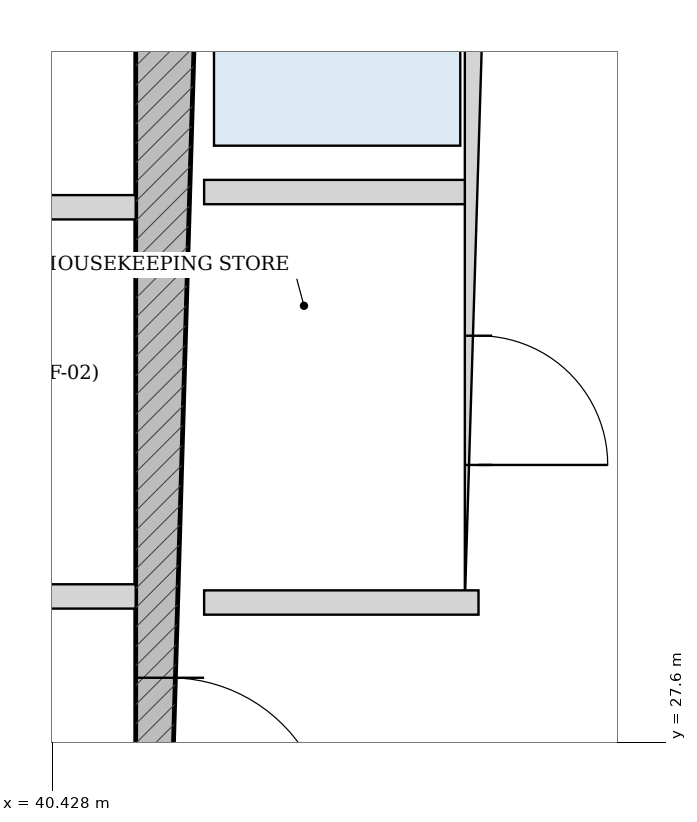
"""IFC4 building model, lengths in metres.
Left out: names, types, materials, properties, quantities, classifications, styles, units other than length and angle.
Written with IfcOpenShell. Run it as: python <this file> out.ifc"""

import sys

from ifc_helpers import new_model, si_unit, direction, frame, frame_2d, origin, place, context, subcontext, project, spatial, rectangle, extrude, source, transform, mapped, element, fill, save


model = new_model("IFC4")
c1 = context("Model", 3, precision=1e-05, world=origin(), true_north=direction((-0.2419218956, 0.970295726276)))
c2 = subcontext(c1, "Body", "Model", "MODEL_VIEW")
j1 = project(units=[si_unit("LENGTHUNIT", "METRE"), si_unit("PLANEANGLEUNIT", "RADIAN")], contexts=[c1])
p1 = place(None, origin())
s1 = spatial("IfcSite", under=j1, at=p1, CompositionType="ELEMENT")
p2 = place(p1, origin())
s2 = spatial("IfcBuilding", under=s1, at=p2, CompositionType="ELEMENT")
p3 = place(p2, frame((0.0, 0.0, 130.2)))
s3 = spatial("IfcBuildingStorey", under=s2, at=p3, CompositionType="ELEMENT", Elevation=130.2)
p4 = place(p3, frame((41.2, 19.175, 0.0), z_axis=(0.0, 0.0, 1.0), x_axis=(0.0, 1.0, 0.0)))
e1 = element("IfcWall", 1, at=p4, inside=s3, PredefinedType="SHEAR", context=c2, shape_type="SweptSolid", body=[
    extrude(rectangle(XDim=15.25, YDim=0.45, at=frame_2d((7.625, 0.0))), origin(), (0.0, 0.0, 1.0), 4.93),
])
p5 = place(p4, frame((7.8, 0.0, 0.0)))
e2 = element("IfcOpeningElement", 2, at=p5, cuts=e1, PredefinedType="OPENING", context=c2, shape_type="SweptSolid", body=[
    extrude(rectangle(XDim=1.05, YDim=2.15, at=frame_2d((0.525, 1.075))), frame((0.0, 0.235, 0.0), z_axis=(0.0, -1.0, 0.0), x_axis=(1.0, 0.0, 0.0)), (0.0, 0.0, 1.0), 0.47),
])
p6 = place(p3, frame((43.23, 28.52, 0.0), z_axis=(0.0, 0.0, 1.0), x_axis=(0.0, 1.0, 0.0)))
e3 = element("IfcWall", 3, at=p6, inside=s3, PredefinedType="PARTITIONING", context=c2, shape_type="SweptSolid", body=[
    extrude(rectangle(XDim=5.905, YDim=0.18, at=frame_2d((2.953, 0.0))), origin(), (0.0, 0.0, 1.0), 4.93),
])
p7 = place(p6, frame((0.905, 0.0, 0.0)))
e4 = element("IfcOpeningElement", 4, at=p7, cuts=e3, PredefinedType="OPENING", context=c2, shape_type="SweptSolid", body=[
    extrude(rectangle(XDim=0.85, YDim=2.1, at=frame_2d((0.425, 1.05))), frame((0.0, 0.1, 0.0), z_axis=(0.0, -1.0, 0.0), x_axis=(1.0, 0.0, 0.0)), (0.0, 0.0, 1.0), 0.2),
])
p8 = place(p6, frame((3.655, 0.0, 0.0)))
e5 = element("IfcOpeningElement", 5, at=p8, cuts=e3, PredefinedType="OPENING", context=c2, shape_type="SweptSolid", body=[
    extrude(rectangle(XDim=1.15, YDim=2.2, at=frame_2d((0.575, 1.1))), frame((0.0, 0.1, 0.0), z_axis=(0.0, -1.0, 0.0), x_axis=(1.0, 0.0, 0.0)), (0.0, 0.0, 1.0), 0.2),
])
p9 = place(p3, frame((41.425, 31.22, 0.0), z_axis=(0.0, 0.0, 1.0), x_axis=(1.0, 0.0, 0.0)))
e6 = element("IfcWall", 6, at=p9, inside=s3, PredefinedType="PARTITIONING", context=c2, shape_type="SweptSolid", body=[
    extrude(rectangle(XDim=1.715, YDim=0.16, at=frame_2d((0.857, 0.0))), origin(), (0.0, 0.0, 1.0), 4.93),
])
p10 = place(p3, frame((41.425, 28.52, 0.0), z_axis=(0.0, 0.0, 1.0), x_axis=(1.0, 0.0, 0.0)))
e7 = element("IfcWall", 7, at=p10, inside=s3, PredefinedType="PARTITIONING", context=c2, shape_type="SweptSolid", body=[
    extrude(rectangle(XDim=1.805, YDim=0.16, at=frame_2d((0.902, 0.0))), origin(), (0.0, 0.0, 1.0), 4.93),
])
p11 = place(p3, frame((35.025, 28.56, 0.0), z_axis=(0.0, 0.0, 1.0), x_axis=(1.0, 0.0, 0.0)))
e8 = element("IfcWall", 8, at=p11, inside=s3, PredefinedType="PARTITIONING", context=c2, shape_type="SweptSolid", body=[
    extrude(rectangle(XDim=5.95, YDim=0.16, at=frame_2d((2.975, 0.0))), origin(), (0.0, 0.0, 1.0), 4.93),
])
p12 = place(p11, frame((0.76, 0.0, 0.0)))
e9 = element("IfcOpeningElement", 9, at=p12, cuts=e8, PredefinedType="OPENING", context=c2, shape_type="SweptSolid", body=[
    extrude(rectangle(XDim=1.1, YDim=2.2, at=frame_2d((0.55, 1.1))), frame((0.0, 0.09, 0.0), z_axis=(0.0, -1.0, 0.0), x_axis=(1.0, 0.0, 0.0)), (0.0, 0.0, 1.0), 0.18),
])
p13 = place(p11, frame((2.425, 0.0, 0.0)))
e10 = element("IfcOpeningElement", 10, at=p13, cuts=e8, PredefinedType="OPENING", context=c2, shape_type="SweptSolid", body=[
    extrude(rectangle(XDim=1.1, YDim=2.2, at=frame_2d((0.55, 1.1))), frame((0.0, 0.09, 0.0), z_axis=(0.0, -1.0, 0.0), x_axis=(1.0, 0.0, 0.0)), (0.0, 0.0, 1.0), 0.18),
])
p14 = place(p11, frame((4.09, 0.0, 0.0)))
e11 = element("IfcOpeningElement", 11, at=p14, cuts=e8, PredefinedType="OPENING", context=c2, shape_type="SweptSolid", body=[
    extrude(rectangle(XDim=1.1, YDim=2.2, at=frame_2d((0.55, 1.1))), frame((0.0, 0.09, 0.0), z_axis=(0.0, -1.0, 0.0), x_axis=(1.0, 0.0, 0.0)), (0.0, 0.0, 1.0), 0.18),
])
p15 = place(p3, frame((35.025, 31.12, 0.0), z_axis=(0.0, 0.0, 1.0), x_axis=(1.0, 0.0, 0.0)))
e12 = element("IfcWall", 12, at=p15, inside=s3, PredefinedType="PARTITIONING", context=c2, shape_type="SweptSolid", body=[
    extrude(rectangle(XDim=5.95, YDim=0.16, at=frame_2d((2.975, 0.0))), origin(), (0.0, 0.0, 1.0), 4.93),
])
m1 = source(origin(), c2, "Body", "SweptSolid", [
    extrude(rectangle(XDim=1.05, YDim=2.15, at=frame_2d((0.525, 1.075))), frame((0.0, 0.025, 0.0), z_axis=(0.0, -1.0, 0.0), x_axis=(1.0, 0.0, 0.0)), (0.0, 0.0, 1.0), 0.05),
])
p16 = place(p5, frame((1.05, 0.0, 0.0), z_axis=(0.0, 0.0, 1.0), x_axis=(-1.0, 0.0, 0.0)))
e13 = element("IfcDoor", 13, at=p16, inside=s3, OperationType="SINGLE_SWING_RIGHT", PredefinedType="DOOR", context=c2, shape_type="MappedRepresentation", body=[
    mapped(m1, transform((0.0, 0.0, 0.0), scale=1.0)),
])
fill(e2, e13)
m2 = source(origin(), c2, "Body", "SweptSolid", [
    extrude(rectangle(XDim=0.85, YDim=2.1, at=frame_2d((0.425, 1.05))), frame((0.0, 0.025, 0.0), z_axis=(0.0, -1.0, 0.0), x_axis=(1.0, 0.0, 0.0)), (0.0, 0.0, 1.0), 0.05),
])
p17 = place(p7, frame((0.85, 0.0, 0.0), z_axis=(0.0, 0.0, 1.0), x_axis=(-1.0, 0.0, 0.0)))
e14 = element("IfcDoor", 14, at=p17, inside=s3, OperationType="SINGLE_SWING_RIGHT", PredefinedType="DOOR", context=c2, shape_type="MappedRepresentation", body=[
    mapped(m2, transform((0.0, 0.0, 0.0), scale=1.0)),
])
fill(e4, e14)
save(model, sys.argv[1])
